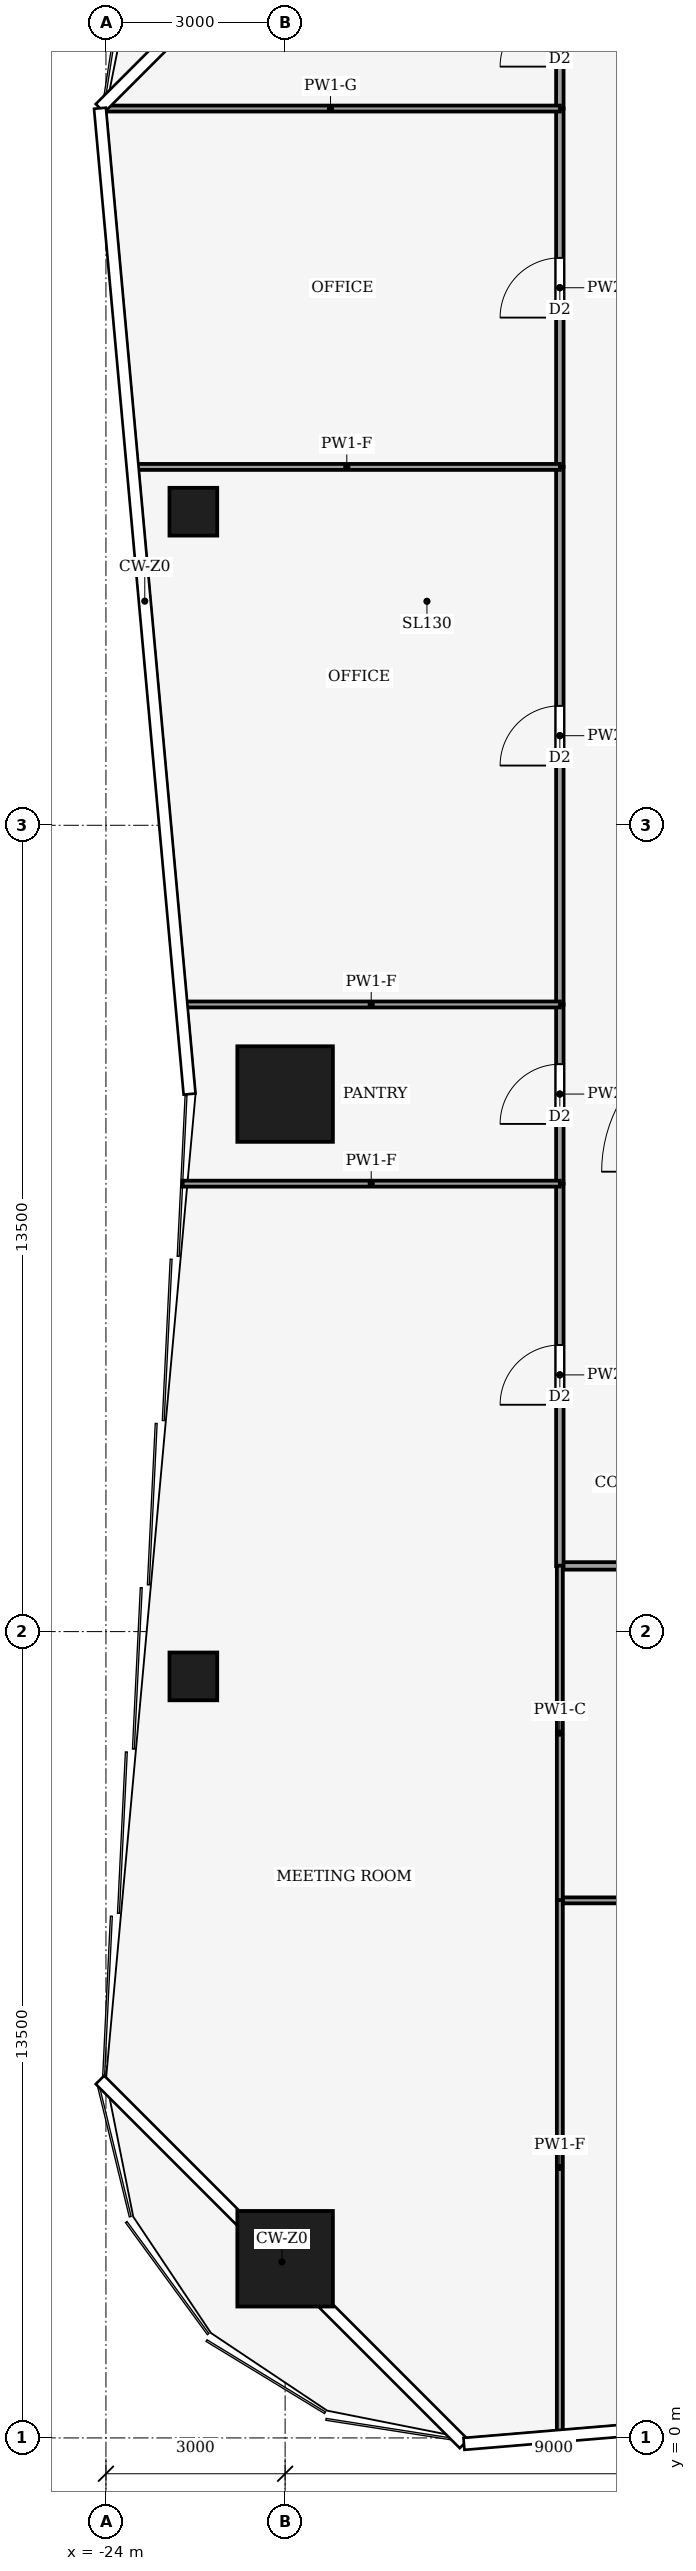
"""IFC4 building model, lengths in metres.
Left out: names, types, materials, properties, quantities, classifications, styles, units other than length and angle.
Written with IfcOpenShell. Run it as: python <this file> out.ifc"""

import sys

from ifc_helpers import new_model, si_unit, direction, frame, frame_2d, origin, origin_2d, place, context, subcontext, project, spatial, rectangle, hollow_rectangle, extrude, element, fill, save


model = new_model("IFC4")
c1 = context("Model", 3, precision=1e-05, world=origin(), true_north=direction((0.0, 1.0)))
c2 = subcontext(c1, "Body", "Model", "MODEL_VIEW")
j1 = project(units=[si_unit("LENGTHUNIT", "METRE"), si_unit("PLANEANGLEUNIT", "RADIAN")], contexts=[c1])
p1 = place(None, origin())
s1 = spatial("IfcSite", under=j1, at=p1, CompositionType="ELEMENT")
p2 = place(p1, origin())
s2 = spatial("IfcBuilding", under=s1, at=p2, CompositionType="ELEMENT")
p3 = place(p2, frame((0.0, 0.0, 18.0)))
s3 = spatial("IfcBuildingStorey", under=s2, at=p3, CompositionType="ELEMENT", Elevation=18.0)
for number, where, z_axis, x_axis in (
    (1, (-21.0, 3.0, 0.0), (0.0, 0.0, 1.0), (1.0, 0.0, 0.0)),
    (2, (-21.0, 22.5, 0.0), (0.0, 0.0, 1.0), (1.0, 0.0, 0.0)),
):
    element("IfcColumn", number, at=place(p3, frame(where, z_axis=z_axis, x_axis=x_axis)), inside=s3, PredefinedType="COLUMN", context=c2, shape_type="SweptSolid", body=[
        extrude(hollow_rectangle(XDim=1.6, YDim=1.6, WallThickness=0.09, at=origin_2d()), origin(), (0.0, 0.0, 1.0), 4.0),
    ])
for number, where, z_axis, x_axis in (
    (3, (-22.536, 12.75, 0.0), (0.0, 0.0, 1.0), (1.0, 0.0, 0.0)),
    (4, (-22.536, 32.25, 0.0), (0.0, 0.0, 1.0), (1.0, 0.0, 0.0)),
):
    element("IfcColumn", number, at=place(p3, frame(where, z_axis=z_axis, x_axis=x_axis)), inside=s3, PredefinedType="COLUMN", context=c2, shape_type="SweptSolid", body=[
        extrude(hollow_rectangle(XDim=0.8, YDim=0.8, WallThickness=0.04, at=origin_2d()), origin(), (0.0, 0.0, 1.0), 4.0),
    ])
p4 = place(p3, frame((-9.0, 14.6, 0.0), z_axis=(0.0, 0.0, 1.0), x_axis=(-1.0, 0.0, 0.0)))
e5 = element("IfcWall", 5, at=p4, inside=s3, PredefinedType="PARTITIONING", context=c2, shape_type="SweptSolid", body=[
    extrude(rectangle(XDim=7.4, YDim=0.125, at=frame_2d((3.7, 0.0))), origin(), (0.0, 0.0, 1.0), 3.29),
])
p5 = place(p4, frame((3.2, 0.0, 0.0)))
e6 = element("IfcOpeningElement", 6, at=p5, cuts=e5, PredefinedType="OPENING", context=c2, shape_type="SweptSolid", body=[
    extrude(rectangle(XDim=1.0, YDim=2.1, at=frame_2d((0.5, 1.05))), frame((0.0, 0.073, 0.0), z_axis=(0.0, -1.0, 0.0), x_axis=(1.0, 0.0, 0.0)), (0.0, 0.0, 1.0), 0.145),
])
p6 = place(p3, frame((-16.4, 14.596, 0.0), z_axis=(0.0, 0.0, 1.0), x_axis=(0.0, 1.0, 0.0)))
e7 = element("IfcWall", 7, at=p6, inside=s3, PredefinedType="PARTITIONING", context=c2, shape_type="SweptSolid", body=[
    extrude(rectangle(XDim=6.404, YDim=0.125, at=frame_2d((3.202, 0.0))), origin(), (0.0, 0.0, 1.0), 3.14),
])
p7 = place(p6, frame((2.702, 0.0, 0.0)))
e8 = element("IfcOpeningElement", 8, at=p7, cuts=e7, PredefinedType="OPENING", context=c2, shape_type="SweptSolid", body=[
    extrude(rectangle(XDim=1.0, YDim=2.1, at=frame_2d((0.5, 1.05))), frame((0.0, 0.073, 0.0), z_axis=(0.0, -1.0, 0.0), x_axis=(1.0, 0.0, 0.0)), (0.0, 0.0, 1.0), 0.145),
])
p8 = place(p3, frame((-16.4, 21.0, 0.0), z_axis=(0.0, 0.0, 1.0), x_axis=(0.0, 1.0, 0.0)))
e9 = element("IfcWall", 9, at=p8, inside=s3, PredefinedType="PARTITIONING", context=c2, shape_type="SweptSolid", body=[
    extrude(rectangle(XDim=3.0, YDim=0.125, at=frame_2d((1.5, 0.0))), origin(), (0.0, 0.0, 1.0), 3.54),
])
p9 = place(p8, frame((1.0, 0.0, 0.0)))
e10 = element("IfcOpeningElement", 10, at=p9, cuts=e9, PredefinedType="OPENING", context=c2, shape_type="SweptSolid", body=[
    extrude(rectangle(XDim=1.0, YDim=2.1, at=frame_2d((0.5, 1.05))), frame((0.0, 0.073, 0.0), z_axis=(0.0, -1.0, 0.0), x_axis=(1.0, 0.0, 0.0)), (0.0, 0.0, 1.0), 0.145),
])
p10 = place(p3, frame((-16.4, 24.0, 0.0), z_axis=(0.0, 0.0, 1.0), x_axis=(0.0, 1.0, 0.0)))
e11 = element("IfcWall", 11, at=p10, inside=s3, PredefinedType="PARTITIONING", context=c2, shape_type="SweptSolid", body=[
    extrude(rectangle(XDim=9.0, YDim=0.125, at=frame_2d((4.5, 0.0))), origin(), (0.0, 0.0, 1.0), 3.48),
])
p11 = place(p10, frame((4.0, 0.0, 0.0)))
e12 = element("IfcOpeningElement", 12, at=p11, cuts=e11, PredefinedType="OPENING", context=c2, shape_type="SweptSolid", body=[
    extrude(rectangle(XDim=1.0, YDim=2.1, at=frame_2d((0.5, 1.05))), frame((0.0, 0.073, 0.0), z_axis=(0.0, -1.0, 0.0), x_axis=(1.0, 0.0, 0.0)), (0.0, 0.0, 1.0), 0.145),
])
p12 = place(p3, frame((-16.4, 33.0, 0.0), z_axis=(0.0, 0.0, 1.0), x_axis=(0.0, 1.0, 0.0)))
e13 = element("IfcWall", 13, at=p12, inside=s3, PredefinedType="PARTITIONING", context=c2, shape_type="SweptSolid", body=[
    extrude(rectangle(XDim=6.0, YDim=0.125, at=frame_2d((3.0, 0.0))), origin(), (0.0, 0.0, 1.0), 3.14),
])
p13 = place(p12, frame((2.5, 0.0, 0.0)))
e14 = element("IfcOpeningElement", 14, at=p13, cuts=e13, PredefinedType="OPENING", context=c2, shape_type="SweptSolid", body=[
    extrude(rectangle(XDim=1.0, YDim=2.1, at=frame_2d((0.5, 1.05))), frame((0.0, 0.073, 0.0), z_axis=(0.0, -1.0, 0.0), x_axis=(1.0, 0.0, 0.0)), (0.0, 0.0, 1.0), 0.145),
])
p14 = place(p3, frame((-16.4, 39.0, 0.0), z_axis=(0.0, 0.0, 1.0), x_axis=(0.0, 1.0, 0.0)))
e15 = element("IfcWall", 15, at=p14, inside=s3, PredefinedType="PARTITIONING", context=c2, shape_type="SweptSolid", body=[
    extrude(rectangle(XDim=2.404, YDim=0.125, at=frame_2d((1.202, 0.0))), origin(), (0.0, 0.0, 1.0), 3.14),
])
p15 = place(p14, frame((0.702, 0.0, 0.0)))
e16 = element("IfcOpeningElement", 16, at=p15, cuts=e15, PredefinedType="OPENING", context=c2, shape_type="SweptSolid", body=[
    extrude(rectangle(XDim=1.0, YDim=2.1, at=frame_2d((0.5, 1.05))), frame((0.0, 0.073, 0.0), z_axis=(0.0, -1.0, 0.0), x_axis=(1.0, 0.0, 0.0)), (0.0, 0.0, 1.0), 0.145),
])
p16 = place(p3, frame((-8.996, 9.0, 0.0), z_axis=(0.0, 0.0, 1.0), x_axis=(-1.0, 0.0, 0.0)))
e17 = element("IfcWall", 17, at=p16, inside=s3, PredefinedType="PARTITIONING", context=c2, shape_type="SweptSolid", body=[
    extrude(rectangle(XDim=7.404, YDim=0.1, at=frame_2d((3.702, 0.0))), origin(), (0.0, 0.0, 1.0), 3.29),
])
p17 = place(p16, frame((3.202, 0.0, 0.0)))
e18 = element("IfcOpeningElement", 18, at=p17, cuts=e17, PredefinedType="OPENING", context=c2, shape_type="SweptSolid", body=[
    extrude(rectangle(XDim=1.0, YDim=2.1, at=frame_2d((0.5, 1.05))), frame((0.0, 0.06, 0.0), z_axis=(0.0, -1.0, 0.0), x_axis=(1.0, 0.0, 0.0)), (0.0, 0.0, 1.0), 0.12),
])
p18 = place(p3, frame((-16.4, 14.604, 0.0), z_axis=(0.0, 0.0, 1.0), x_axis=(0.0, -1.0, 0.0)))
e19 = element("IfcWall", 19, at=p18, inside=s3, PredefinedType="PARTITIONING", context=c2, shape_type="SweptSolid", body=[
    extrude(rectangle(XDim=5.608, YDim=0.1, at=frame_2d((2.804, 0.0))), origin(), (0.0, 0.0, 1.0), 3.87),
])
p19 = place(p3, frame((-16.4, 9.004, 0.0), z_axis=(0.0, 0.0, 1.0), x_axis=(0.0, -1.0, 0.0)))
e20 = element("IfcWall", 20, at=p19, inside=s3, PredefinedType="PARTITIONING", context=c2, shape_type="SweptSolid", body=[
    extrude(rectangle(XDim=8.951, YDim=0.1, at=frame_2d((4.475, 0.0))), origin(), (0.0, 0.0, 1.0), 3.04),
])
for number, where, z_axis, x_axis in (
    (21, (-16.4, 21.0, 0.0), (0.0, 0.0, 1.0), (-1.0, 0.0, 0.0)),
    (22, (-16.4, 24.0, 0.0), (0.0, 0.0, 1.0), (-1.0, 0.0, 0.0)),
):
    element("IfcWall", number, at=place(p3, frame(where, z_axis=z_axis, x_axis=x_axis)), inside=s3, PredefinedType="PARTITIONING", context=c2, shape_type="SweptSolid", body=[
        extrude(rectangle(XDim=6.316, YDim=0.1, at=frame_2d((3.158, 0.0))), origin(), (0.0, 0.0, 1.0), 3.04),
    ])
p20 = place(p3, frame((-16.4, 33.0, 0.0), z_axis=(0.0, 0.0, 1.0), x_axis=(-1.0, 0.0, 0.0)))
e23 = element("IfcWall", 23, at=p20, inside=s3, PredefinedType="PARTITIONING", context=c2, shape_type="SweptSolid", body=[
    extrude(rectangle(XDim=7.135, YDim=0.1, at=frame_2d((3.567, 0.0))), origin(), (0.0, 0.0, 1.0), 3.04),
])
p21 = place(p3, frame((-16.4, 39.0, 0.0), z_axis=(0.0, 0.0, 1.0), x_axis=(-1.0, 0.0, 0.0)))
e24 = element("IfcWall", 24, at=p21, inside=s3, PredefinedType="PARTITIONING", context=c2, shape_type="SweptSolid", body=[
    extrude(rectangle(XDim=7.68, YDim=0.1, at=frame_2d((3.84, 0.0))), origin(), (0.0, 0.0, 1.0), 2.93),
])
p22 = place(p7, origin())
e25 = element("IfcDoor", 25, at=p22, inside=s3, OperationType="SINGLE_SWING_RIGHT", PredefinedType="DOOR", context=c2, shape_type="SweptSolid", body=[
    extrude(rectangle(XDim=1.0, YDim=2.1, at=frame_2d((0.5, 1.05))), frame((0.0, 0.025, 0.0), z_axis=(0.0, -1.0, 0.0), x_axis=(1.0, 0.0, 0.0)), (0.0, 0.0, 1.0), 0.05),
])
fill(e8, e25)
p23 = place(p9, origin())
e26 = element("IfcDoor", 26, at=p23, inside=s3, OperationType="SINGLE_SWING_LEFT", PredefinedType="DOOR", context=c2, shape_type="SweptSolid", body=[
    extrude(rectangle(XDim=1.0, YDim=2.1, at=frame_2d((0.5, 1.05))), frame((0.0, 0.025, 0.0), z_axis=(0.0, -1.0, 0.0), x_axis=(1.0, 0.0, 0.0)), (0.0, 0.0, 1.0), 0.05),
])
fill(e10, e26)
p24 = place(p11, origin())
e27 = element("IfcDoor", 27, at=p24, inside=s3, OperationType="SINGLE_SWING_RIGHT", PredefinedType="DOOR", context=c2, shape_type="SweptSolid", body=[
    extrude(rectangle(XDim=1.0, YDim=2.1, at=frame_2d((0.5, 1.05))), frame((0.0, 0.025, 0.0), z_axis=(0.0, -1.0, 0.0), x_axis=(1.0, 0.0, 0.0)), (0.0, 0.0, 1.0), 0.05),
])
fill(e12, e27)
p25 = place(p13, origin())
e28 = element("IfcDoor", 28, at=p25, inside=s3, OperationType="SINGLE_SWING_LEFT", PredefinedType="DOOR", context=c2, shape_type="SweptSolid", body=[
    extrude(rectangle(XDim=1.0, YDim=2.1, at=frame_2d((0.5, 1.05))), frame((0.0, 0.025, 0.0), z_axis=(0.0, -1.0, 0.0), x_axis=(1.0, 0.0, 0.0)), (0.0, 0.0, 1.0), 0.05),
])
fill(e14, e28)
p26 = place(p15, origin())
e29 = element("IfcDoor", 29, at=p26, inside=s3, OperationType="SINGLE_SWING_RIGHT", PredefinedType="DOOR", context=c2, shape_type="SweptSolid", body=[
    extrude(rectangle(XDim=1.0, YDim=2.1, at=frame_2d((0.5, 1.05))), frame((0.0, 0.025, 0.0), z_axis=(0.0, -1.0, 0.0), x_axis=(1.0, 0.0, 0.0)), (0.0, 0.0, 1.0), 0.05),
])
fill(e16, e29)
save(model, sys.argv[1])
